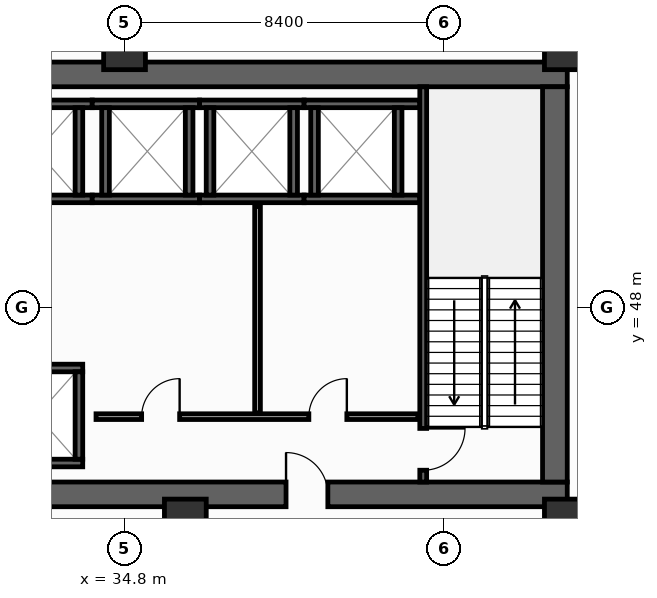
"""IFC4 building model, lengths in metres.
Left out: names, types, materials, properties, quantities, classifications, styles, units other than length and angle.
Written with IfcOpenShell. Run it as: python <this file> out.ifc"""

import sys

from ifc_helpers import new_model, si_unit, direction, frame, frame_2d, origin, origin_2d, place, context, subcontext, project, spatial, rectangle, extrude, element, fill, save


model = new_model("IFC4")
c1 = context("Model", 3, precision=1e-05, world=origin(), true_north=direction((0.0, 1.0)))
c2 = subcontext(c1, "Body", "Model", "MODEL_VIEW")
j1 = project(units=[si_unit("LENGTHUNIT", "METRE"), si_unit("PLANEANGLEUNIT", "RADIAN")], contexts=[c1])
p1 = place(None, origin())
s1 = spatial("IfcSite", under=j1, at=p1, CompositionType="ELEMENT")
p2 = place(p1, origin())
s2 = spatial("IfcBuilding", under=s1, at=p2, CompositionType="ELEMENT")
p3 = place(p2, frame((0.0, 0.0, -5.4)))
s3 = spatial("IfcBuildingStorey", under=s2, at=p3, CompositionType="ELEMENT", Elevation=-5.4)
p4 = place(p3, frame((13.45, 43.075, 0.0), z_axis=(0.0, 0.0, 1.0), x_axis=(1.0, 0.0, 0.0)))
e1 = element("IfcWall", 1, at=p4, inside=s3, PredefinedType="SHEAR", context=c2, shape_type="SweptSolid", body=[
    extrude(rectangle(XDim=33.0, YDim=0.65, at=frame_2d((16.5, 0.0))), origin(), (0.0, 0.0, 1.0), 5.05),
])
p5 = place(p4, frame((5.4, 0.0, 0.0)))
e2 = element("IfcOpeningElement", 2, at=p5, cuts=e1, PredefinedType="OPENING", context=c2, shape_type="SweptSolid", body=[
    extrude(rectangle(XDim=1.1, YDim=2.15, at=frame_2d((0.55, 1.075))), frame((0.0, 0.335, 0.0), z_axis=(0.0, -1.0, 0.0), x_axis=(1.0, 0.0, 0.0)), (0.0, 0.0, 1.0), 0.67),
])
p6 = place(p4, frame((25.6, 0.0, 0.0)))
e3 = element("IfcOpeningElement", 3, at=p6, cuts=e1, PredefinedType="OPENING", context=c2, shape_type="SweptSolid", body=[
    extrude(rectangle(XDim=1.1, YDim=2.15, at=frame_2d((0.55, 1.075))), frame((0.0, 0.335, 0.0), z_axis=(0.0, -1.0, 0.0), x_axis=(1.0, 0.0, 0.0)), (0.0, 0.0, 1.0), 0.67),
])
p7 = place(p3, frame((13.45, 54.125, 0.0), z_axis=(0.0, 0.0, 1.0), x_axis=(1.0, 0.0, 0.0)))
e4 = element("IfcWall", 4, at=p7, inside=s3, PredefinedType="SHEAR", context=c2, shape_type="SweptSolid", body=[
    extrude(rectangle(XDim=33.0, YDim=0.65, at=frame_2d((16.5, 0.0))), origin(), (0.0, 0.0, 1.0), 5.05),
])
p8 = place(p3, frame((46.125, 43.4, 0.0), z_axis=(0.0, 0.0, 1.0), x_axis=(0.0, 1.0, 0.0)))
e5 = element("IfcWall", 5, at=p8, inside=s3, PredefinedType="SHEAR", context=c2, shape_type="SweptSolid", body=[
    extrude(rectangle(XDim=10.4, YDim=0.65, at=frame_2d((5.2, 0.0))), origin(), (0.0, 0.0, 1.0), 5.05),
])
for number, where, z_axis, x_axis in (
    (6, (34.8, 54.8, 0.0), (0.0, 0.0, 1.0), (1.0, 0.0, 0.0)),
    (7, (46.4, 54.8, 0.0), (0.0, 0.0, 1.0), (1.0, 0.0, 0.0)),
    (8, (36.4, 42.4, 0.0), (0.0, 0.0, 1.0), (1.0, 0.0, 0.0)),
    (9, (46.4, 42.4, 0.0), (0.0, 0.0, 1.0), (1.0, 0.0, 0.0)),
):
    element("IfcColumn", number, at=place(p3, frame(where, z_axis=z_axis, x_axis=x_axis)), inside=s3, PredefinedType="COLUMN", context=c2, shape_type="SweptSolid", body=[
        extrude(rectangle(XDim=1.1, YDim=1.1, at=origin_2d()), origin(), (0.0, 0.0, 1.0), 5.4),
    ])
for number, where, z_axis, x_axis in (
    (10, (31.125, 50.85, 0.0), (0.0, 0.0, 1.0), (1.0, 0.0, 0.0)),
    (11, (31.125, 53.35, 0.0), (0.0, 0.0, 1.0), (1.0, 0.0, 0.0)),
):
    element("IfcWall", number, at=place(p3, frame(where, z_axis=z_axis, x_axis=x_axis)), inside=s3, PredefinedType="SHEAR", context=c2, shape_type="SweptSolid", body=[
        extrude(rectangle(XDim=2.825, YDim=0.2, at=frame_2d((1.413, 0.0))), origin(), (0.0, 0.0, 1.0), 5.05),
    ])
p9 = place(p3, frame((33.6, 50.95, 0.0), z_axis=(0.0, 0.0, 1.0), x_axis=(0.0, 1.0, 0.0)))
e12 = element("IfcWall", 12, at=p9, inside=s3, PredefinedType="SHEAR", context=c2, shape_type="SweptSolid", body=[
    extrude(rectangle(XDim=2.3, YDim=0.2, at=frame_2d((1.15, 0.0))), origin(), (0.0, 0.0, 1.0), 5.05),
])
for number, where, z_axis, x_axis in (
    (13, (31.125, 43.9, 0.0), (0.0, 0.0, 1.0), (1.0, 0.0, 0.0)),
    (14, (31.125, 46.4, 0.0), (0.0, 0.0, 1.0), (1.0, 0.0, 0.0)),
):
    element("IfcWall", number, at=place(p3, frame(where, z_axis=z_axis, x_axis=x_axis)), inside=s3, PredefinedType="SHEAR", context=c2, shape_type="SweptSolid", body=[
        extrude(rectangle(XDim=2.575, YDim=0.2, at=frame_2d((1.288, 0.0))), origin(), (0.0, 0.0, 1.0), 5.05),
    ])
p10 = place(p3, frame((33.6, 44.0, 0.0), z_axis=(0.0, 0.0, 1.0), x_axis=(0.0, 1.0, 0.0)))
e15 = element("IfcWall", 15, at=p10, inside=s3, PredefinedType="SHEAR", context=c2, shape_type="SweptSolid", body=[
    extrude(rectangle(XDim=2.3, YDim=0.2, at=frame_2d((1.15, 0.0))), origin(), (0.0, 0.0, 1.0), 5.05),
])
for number, where, z_axis, x_axis in (
    (16, (33.95, 50.85, 0.0), (0.0, 0.0, 1.0), (1.0, 0.0, 0.0)),
    (17, (33.95, 53.35, 0.0), (0.0, 0.0, 1.0), (1.0, 0.0, 0.0)),
):
    element("IfcWall", number, at=place(p3, frame(where, z_axis=z_axis, x_axis=x_axis)), inside=s3, PredefinedType="SHEAR", context=c2, shape_type="SweptSolid", body=[
        extrude(rectangle(XDim=2.825, YDim=0.2, at=frame_2d((1.413, 0.0))), origin(), (0.0, 0.0, 1.0), 5.05),
    ])
for number, where, z_axis, x_axis in (
    (18, (34.3, 50.95, 0.0), (0.0, 0.0, 1.0), (0.0, 1.0, 0.0)),
    (19, (36.5, 50.95, 0.0), (0.0, 0.0, 1.0), (0.0, 1.0, 0.0)),
):
    element("IfcWall", number, at=place(p3, frame(where, z_axis=z_axis, x_axis=x_axis)), inside=s3, PredefinedType="SHEAR", context=c2, shape_type="SweptSolid", body=[
        extrude(rectangle(XDim=2.3, YDim=0.2, at=frame_2d((1.15, 0.0))), origin(), (0.0, 0.0, 1.0), 5.05),
    ])
for number, where, z_axis, x_axis in (
    (20, (36.775, 50.85, 0.0), (0.0, 0.0, 1.0), (1.0, 0.0, 0.0)),
    (21, (36.775, 53.35, 0.0), (0.0, 0.0, 1.0), (1.0, 0.0, 0.0)),
):
    element("IfcWall", number, at=place(p3, frame(where, z_axis=z_axis, x_axis=x_axis)), inside=s3, PredefinedType="SHEAR", context=c2, shape_type="SweptSolid", body=[
        extrude(rectangle(XDim=2.75, YDim=0.2, at=frame_2d((1.375, 0.0))), origin(), (0.0, 0.0, 1.0), 5.05),
    ])
for number, where, z_axis, x_axis in (
    (22, (37.05, 50.95, 0.0), (0.0, 0.0, 1.0), (0.0, 1.0, 0.0)),
    (23, (39.25, 50.95, 0.0), (0.0, 0.0, 1.0), (0.0, 1.0, 0.0)),
):
    element("IfcWall", number, at=place(p3, frame(where, z_axis=z_axis, x_axis=x_axis)), inside=s3, PredefinedType="SHEAR", context=c2, shape_type="SweptSolid", body=[
        extrude(rectangle(XDim=2.3, YDim=0.2, at=frame_2d((1.15, 0.0))), origin(), (0.0, 0.0, 1.0), 5.05),
    ])
for number, where, z_axis, x_axis in (
    (24, (39.525, 50.85, 0.0), (0.0, 0.0, 1.0), (1.0, 0.0, 0.0)),
    (25, (39.525, 53.35, 0.0), (0.0, 0.0, 1.0), (1.0, 0.0, 0.0)),
):
    element("IfcWall", number, at=place(p3, frame(where, z_axis=z_axis, x_axis=x_axis)), inside=s3, PredefinedType="SHEAR", context=c2, shape_type="SweptSolid", body=[
        extrude(rectangle(XDim=3.045, YDim=0.2, at=frame_2d((1.522, 0.0))), origin(), (0.0, 0.0, 1.0), 5.05),
    ])
for number, where, z_axis, x_axis in (
    (26, (39.8, 50.95, 0.0), (0.0, 0.0, 1.0), (0.0, 1.0, 0.0)),
    (27, (42.0, 50.95, 0.0), (0.0, 0.0, 1.0), (0.0, 1.0, 0.0)),
):
    element("IfcWall", number, at=place(p3, frame(where, z_axis=z_axis, x_axis=x_axis)), inside=s3, PredefinedType="SHEAR", context=c2, shape_type="SweptSolid", body=[
        extrude(rectangle(XDim=2.3, YDim=0.2, at=frame_2d((1.15, 0.0))), origin(), (0.0, 0.0, 1.0), 5.05),
    ])
p11 = place(p3, frame((42.66, 53.8, 0.0), z_axis=(0.0, 0.0, 1.0), x_axis=(0.0, -1.0, 0.0)))
e28 = element("IfcWall", 28, at=p11, inside=s3, PredefinedType="SHEAR", context=c2, shape_type="SweptSolid", body=[
    extrude(rectangle(XDim=10.4, YDim=0.18, at=frame_2d((5.2, 0.0))), origin(), (0.0, 0.0, 1.0), 5.05),
])
p12 = place(p11, frame((8.99, 0.0, 0.0)))
e29 = element("IfcOpeningElement", 29, at=p12, cuts=e28, PredefinedType="OPENING", context=c2, shape_type="SweptSolid", body=[
    extrude(rectangle(XDim=1.1, YDim=2.15, at=frame_2d((0.55, 1.075))), frame((0.0, 0.1, 0.0), z_axis=(0.0, -1.0, 0.0), x_axis=(1.0, 0.0, 0.0)), (0.0, 0.0, 1.0), 0.2),
])
p13 = place(p3, frame((34.05, 45.12, 0.0), z_axis=(0.0, 0.0, 1.0), x_axis=(1.0, 0.0, 0.0)))
e30 = element("IfcWall", 30, at=p13, inside=s3, PredefinedType="PARTITIONING", context=c2, shape_type="SweptSolid", body=[
    extrude(rectangle(XDim=8.47, YDim=0.15, at=frame_2d((4.235, 0.0))), origin(), (0.0, 0.0, 1.0), 5.05),
])
p14 = place(p13, frame((1.2, 0.0, 0.0)))
e31 = element("IfcOpeningElement", 31, at=p14, cuts=e30, PredefinedType="OPENING", context=c2, shape_type="SweptSolid", body=[
    extrude(rectangle(XDim=1.0, YDim=2.15, at=frame_2d((0.5, 1.075))), frame((0.0, 0.085, 0.0), z_axis=(0.0, -1.0, 0.0), x_axis=(1.0, 0.0, 0.0)), (0.0, 0.0, 1.0), 0.17),
])
p15 = place(p13, frame((5.6, 0.0, 0.0)))
e32 = element("IfcOpeningElement", 32, at=p15, cuts=e30, PredefinedType="OPENING", context=c2, shape_type="SweptSolid", body=[
    extrude(rectangle(XDim=1.0, YDim=2.15, at=frame_2d((0.5, 1.075))), frame((0.0, 0.085, 0.0), z_axis=(0.0, -1.0, 0.0), x_axis=(1.0, 0.0, 0.0)), (0.0, 0.0, 1.0), 0.17),
])
p16 = place(p3, frame((38.3, 45.22, 0.0), z_axis=(0.0, 0.0, 1.0), x_axis=(0.0, 1.0, 0.0)))
e33 = element("IfcWall", 33, at=p16, inside=s3, PredefinedType="PARTITIONING", context=c2, shape_type="SweptSolid", body=[
    extrude(rectangle(XDim=5.43, YDim=0.15, at=frame_2d((2.715, 0.0))), origin(), (0.0, 0.0, 1.0), 5.05),
])
p17 = place(p12, origin())
e34 = element("IfcDoor", 34, at=p17, inside=s3, OperationType="SINGLE_SWING_LEFT", PredefinedType="DOOR", context=c2, shape_type="SweptSolid", body=[
    extrude(rectangle(XDim=1.1, YDim=2.15, at=frame_2d((0.55, 1.075))), frame((0.0, 0.025, 0.0), z_axis=(0.0, -1.0, 0.0), x_axis=(1.0, 0.0, 0.0)), (0.0, 0.0, 1.0), 0.05),
])
fill(e29, e34)
p18 = place(p6, origin())
e35 = element("IfcDoor", 35, at=p18, inside=s3, OperationType="SINGLE_SWING_LEFT", PredefinedType="DOOR", context=c2, shape_type="SweptSolid", body=[
    extrude(rectangle(XDim=1.1, YDim=2.15, at=frame_2d((0.55, 1.075))), frame((0.0, 0.025, 0.0), z_axis=(0.0, -1.0, 0.0), x_axis=(1.0, 0.0, 0.0)), (0.0, 0.0, 1.0), 0.05),
])
fill(e3, e35)
p19 = place(p14, origin())
e36 = element("IfcDoor", 36, at=p19, inside=s3, OperationType="SINGLE_SWING_RIGHT", PredefinedType="DOOR", context=c2, shape_type="SweptSolid", body=[
    extrude(rectangle(XDim=1.0, YDim=2.15, at=frame_2d((0.5, 1.075))), frame((0.0, 0.025, 0.0), z_axis=(0.0, -1.0, 0.0), x_axis=(1.0, 0.0, 0.0)), (0.0, 0.0, 1.0), 0.05),
])
fill(e31, e36)
p20 = place(p15, origin())
e37 = element("IfcDoor", 37, at=p20, inside=s3, OperationType="SINGLE_SWING_RIGHT", PredefinedType="DOOR", context=c2, shape_type="SweptSolid", body=[
    extrude(rectangle(XDim=1.0, YDim=2.15, at=frame_2d((0.5, 1.075))), frame((0.0, 0.025, 0.0), z_axis=(0.0, -1.0, 0.0), x_axis=(1.0, 0.0, 0.0)), (0.0, 0.0, 1.0), 0.05),
])
fill(e32, e37)
save(model, sys.argv[1])
